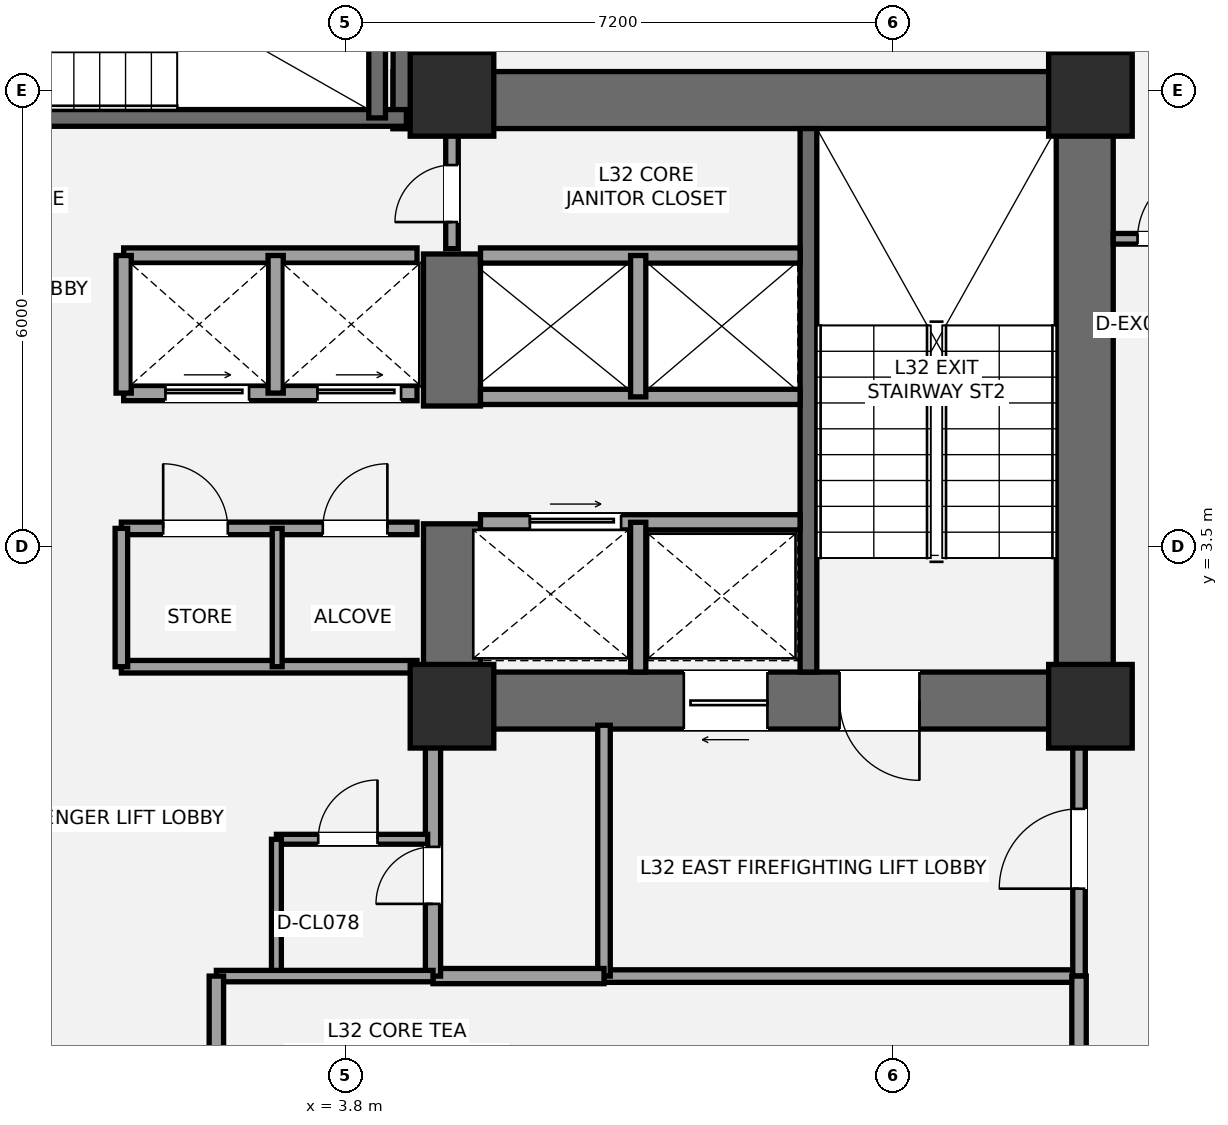
"""IFC4 building model, lengths in metres.
Left out: names, types, materials, properties, quantities, classifications, styles, units other than length and angle.
Written with IfcOpenShell. Run it as: python <this file> out.ifc"""

import sys

from ifc_helpers import new_model, si_unit, direction, frame, frame_2d, origin, origin_2d, place, context, subcontext, project, spatial, rectangle, extrude, element, fill, save


model = new_model("IFC4")
c1 = context("Model", 3, precision=1e-05, world=origin(), true_north=direction((0.0, 1.0)))
c2 = subcontext(c1, "Body", "Model", "MODEL_VIEW")
j1 = project(units=[si_unit("LENGTHUNIT", "METRE"), si_unit("PLANEANGLEUNIT", "RADIAN")], contexts=[c1])
p1 = place(None, origin())
s1 = spatial("IfcSite", under=j1, at=p1, CompositionType="ELEMENT")
p2 = place(p1, origin())
s2 = spatial("IfcBuilding", under=s1, at=p2, CompositionType="ELEMENT")
p3 = place(p2, frame((0.0, 0.0, 121.1)))
s3 = spatial("IfcBuildingStorey", under=s2, at=p3, CompositionType="ELEMENT", Elevation=121.1)
p4 = place(p3, frame((13.525, 1.1, 0.0), z_axis=(0.0, 0.0, 1.0), x_axis=(0.0, 1.0, 0.0)))
e1 = element("IfcWall", 1, at=p4, inside=s3, PredefinedType="SHEAR", context=c2, shape_type="SweptSolid", body=[
    extrude(rectangle(XDim=8.65, YDim=0.75, at=frame_2d((4.325, 0.0))), origin(), (0.0, 0.0, 1.0), 3.5),
])
p5 = place(p3, frame((4.425, 9.375, 0.0), z_axis=(0.0, 0.0, 1.0), x_axis=(1.0, 0.0, 0.0)))
e2 = element("IfcWall", 2, at=p5, inside=s3, PredefinedType="SHEAR", context=c2, shape_type="SweptSolid", body=[
    extrude(rectangle(XDim=9.475, YDim=0.75, at=frame_2d((4.737, 0.0))), origin(), (0.0, 0.0, 1.0), 3.5),
])
p6 = place(p3, frame((13.9, 1.475, 0.0), z_axis=(0.0, 0.0, 1.0), x_axis=(-1.0, 0.0, 0.0)))
e3 = element("IfcWall", 3, at=p6, inside=s3, PredefinedType="SHEAR", context=c2, shape_type="SweptSolid", body=[
    extrude(rectangle(XDim=9.075, YDim=0.75, at=frame_2d((4.538, 0.0))), origin(), (0.0, 0.0, 1.0), 3.5),
])
p7 = place(p6, frame((2.55, 0.0, 0.0)))
e4 = element("IfcOpeningElement", 4, at=p7, cuts=e3, PredefinedType="OPENING", context=c2, shape_type="SweptSolid", body=[
    extrude(rectangle(XDim=1.05, YDim=2.15, at=frame_2d((0.525, 1.075))), frame((0.0, 0.385, 0.0), z_axis=(0.0, -1.0, 0.0), x_axis=(1.0, 0.0, 0.0)), (0.0, 0.0, 1.0), 0.77),
])
p8 = place(p6, frame((4.55, 0.0, 0.0)))
e5 = element("IfcOpeningElement", 5, at=p8, cuts=e3, PredefinedType="OPENING", context=c2, shape_type="SweptSolid", body=[
    extrude(rectangle(XDim=1.1, YDim=2.2, at=frame_2d((0.55, 1.1))), frame((0.0, 0.385, 0.0), z_axis=(0.0, -1.0, 0.0), x_axis=(1.0, 0.0, 0.0)), (0.0, 0.0, 1.0), 0.77),
])
p9 = place(p3, frame((5.2, 1.1, 0.0), z_axis=(0.0, 0.0, 1.0), x_axis=(0.0, 1.0, 0.0)))
e6 = element("IfcWall", 6, at=p9, inside=s3, PredefinedType="SHEAR", context=c2, shape_type="SweptSolid", body=[
    extrude(rectangle(XDim=2.7, YDim=0.75, at=frame_2d((1.35, 0.0))), origin(), (0.0, 0.0, 1.0), 3.5),
])
p10 = place(p3, frame((5.2, 5.35, 0.0), z_axis=(0.0, 0.0, 1.0), x_axis=(0.0, 1.0, 0.0)))
e7 = element("IfcWall", 7, at=p10, inside=s3, PredefinedType="SHEAR", context=c2, shape_type="SweptSolid", body=[
    extrude(rectangle(XDim=2.0, YDim=0.75, at=frame_2d((1.0, 0.0))), origin(), (0.0, 0.0, 1.0), 3.5),
])
p11 = place(p3, frame((9.89, 1.85, 0.0), z_axis=(0.0, 0.0, 1.0), x_axis=(0.0, 1.0, 0.0)))
e8 = element("IfcWall", 8, at=p11, inside=s3, PredefinedType="SHEAR", context=c2, shape_type="SweptSolid", body=[
    extrude(rectangle(XDim=7.15, YDim=0.22, at=frame_2d((3.575, 0.0))), origin(), (0.0, 0.0, 1.0), 3.5),
])
p12 = place(p3, frame((4.8, 9.0, 0.0), z_axis=(0.0, 0.0, 1.0), x_axis=(0.0, 1.0, 0.0)))
e9 = element("IfcWall", 9, at=p12, inside=s3, PredefinedType="SHEAR", context=c2, shape_type="SweptSolid", body=[
    extrude(rectangle(XDim=4.15, YDim=0.75, at=frame_2d((2.075, 0.0))), origin(), (0.0, 0.0, 1.0), 3.5),
])
p13 = place(p3, frame((-4.7, 9.14, 0.0), z_axis=(0.0, 0.0, 1.0), x_axis=(1.0, 0.0, 0.0)))
e10 = element("IfcWall", 10, at=p13, inside=s3, PredefinedType="SHEAR", context=c2, shape_type="SweptSolid", body=[
    extrude(rectangle(XDim=9.3, YDim=0.22, at=frame_2d((4.65, 0.0))), origin(), (0.0, 0.0, 1.0), 3.5),
])
p14 = place(p13, frame((1.15, 0.0, 0.0)))
e11 = element("IfcOpeningElement", 11, at=p14, cuts=e10, PredefinedType="OPENING", context=c2, shape_type="SweptSolid", body=[
    extrude(rectangle(XDim=1.05, YDim=2.15, at=frame_2d((0.525, 1.075))), frame((0.0, 0.12, 0.0), z_axis=(0.0, -1.0, 0.0), x_axis=(1.0, 0.0, 0.0)), (0.0, 0.0, 1.0), 0.24),
])
p15 = place(p3, frame((4.215, 9.14, 0.0), z_axis=(0.0, 0.0, 1.0), x_axis=(0.0, 1.0, 0.0)))
e12 = element("IfcWall", 12, at=p15, inside=s3, PredefinedType="SHEAR", context=c2, shape_type="SweptSolid", body=[
    extrude(rectangle(XDim=3.26, YDim=0.22, at=frame_2d((1.63, 0.0))), origin(), (0.0, 0.0, 1.0), 3.5),
])
for number, where, z_axis, x_axis in (
    (13, (5.2, 1.4, 0.0), (0.0, 0.0, 1.0), (1.0, 0.0, 0.0)),
    (14, (5.2, 9.45, 0.0), (0.0, 0.0, 1.0), (1.0, 0.0, 0.0)),
    (15, (13.6, 1.4, 0.0), (0.0, 0.0, 1.0), (1.0, 0.0, 0.0)),
    (16, (13.6, 9.45, 0.0), (0.0, 0.0, 1.0), (1.0, 0.0, 0.0)),
):
    element("IfcColumn", number, at=place(p3, frame(where, z_axis=z_axis, x_axis=x_axis)), inside=s3, PredefinedType="COLUMN", context=c2, shape_type="SweptSolid", body=[
        extrude(rectangle(XDim=1.1, YDim=1.1, at=origin_2d()), origin(), (0.0, 0.0, 1.0), 3.5),
    ])
p16 = place(p3, frame((7.2, -2.15, 0.0), z_axis=(0.0, 0.0, 1.0), x_axis=(1.0, 0.0, 0.0)))
e17 = element("IfcWall", 17, at=p16, inside=s3, PredefinedType="PARTITIONING", context=c2, shape_type="SweptSolid", body=[
    extrude(rectangle(XDim=6.25, YDim=0.165, at=frame_2d((3.125, 0.0))), origin(), (0.0, 0.0, 1.0), 3.31),
])
p17 = place(p3, frame((7.2, -2.15, 0.0), z_axis=(0.0, 0.0, 1.0), x_axis=(0.0, 1.0, 0.0)))
e18 = element("IfcWall", 18, at=p17, inside=s3, PredefinedType="PARTITIONING", context=c2, shape_type="SweptSolid", body=[
    extrude(rectangle(XDim=3.3, YDim=0.165, at=frame_2d((1.65, 0.0))), origin(), (0.0, 0.0, 1.0), 2.763),
])
p18 = place(p3, frame((13.45, -2.15, 0.0), z_axis=(0.0, 0.0, 1.0), x_axis=(0.0, 1.0, 0.0)))
e19 = element("IfcWall", 19, at=p18, inside=s3, PredefinedType="PARTITIONING", context=c2, shape_type="SweptSolid", body=[
    extrude(rectangle(XDim=3.3, YDim=0.165, at=frame_2d((1.65, 0.0))), origin(), (0.0, 0.0, 1.0), 2.763),
])
p19 = place(p18, frame((1.15, 0.0, 0.0)))
e20 = element("IfcOpeningElement", 20, at=p19, cuts=e19, PredefinedType="OPENING", context=c2, shape_type="SweptSolid", body=[
    extrude(rectangle(XDim=1.05, YDim=2.15, at=frame_2d((0.525, 1.075))), frame((0.0, 0.093, 0.0), z_axis=(0.0, -1.0, 0.0), x_axis=(1.0, 0.0, 0.0)), (0.0, 0.0, 1.0), 0.185),
])
p20 = place(p3, frame((4.95, -2.15, 0.0), z_axis=(0.0, 0.0, 1.0), x_axis=(1.0, 0.0, 0.0)))
e21 = element("IfcWall", 21, at=p20, inside=s3, PredefinedType="SOLIDWALL", context=c2, shape_type="SweptSolid", body=[
    extrude(rectangle(XDim=2.25, YDim=0.2, at=frame_2d((1.125, 0.0))), origin(), (0.0, 0.0, 1.0), 3.31),
])
p21 = place(p3, frame((4.95, -2.15, 0.0), z_axis=(0.0, 0.0, 1.0), x_axis=(0.0, 1.0, 0.0)))
e22 = element("IfcWall", 22, at=p21, inside=s3, PredefinedType="SOLIDWALL", context=c2, shape_type="SweptSolid", body=[
    extrude(rectangle(XDim=3.3, YDim=0.2, at=frame_2d((1.65, 0.0))), origin(), (0.0, 0.0, 1.0), 2.763),
])
p22 = place(p21, frame((0.95, 0.0, 0.0)))
e23 = element("IfcOpeningElement", 23, at=p22, cuts=e22, PredefinedType="OPENING", context=c2, shape_type="SweptSolid", body=[
    extrude(rectangle(XDim=0.75, YDim=2.1, at=frame_2d((0.375, 1.05))), frame((0.0, 0.11, 0.0), z_axis=(0.0, -1.0, 0.0), x_axis=(1.0, 0.0, 0.0)), (0.0, 0.0, 1.0), 0.22),
])
p23 = place(p3, frame((2.89, -0.35, 0.0), z_axis=(0.0, 0.0, 1.0), x_axis=(1.0, 0.0, 0.0)))
e24 = element("IfcWall", 24, at=p23, inside=s3, PredefinedType="PARTITIONING", context=c2, shape_type="SweptSolid", body=[
    extrude(rectangle(XDim=1.99, YDim=0.13, at=frame_2d((0.995, 0.0))), origin(), (0.0, 0.0, 1.0), 3.31),
])
p24 = place(p23, frame((0.55, 0.0, 0.0)))
e25 = element("IfcOpeningElement", 25, at=p24, cuts=e24, PredefinedType="OPENING", context=c2, shape_type="SweptSolid", body=[
    extrude(rectangle(XDim=0.78, YDim=2.1, at=frame_2d((0.39, 1.05))), frame((0.0, 0.075, 0.0), z_axis=(0.0, -1.0, 0.0), x_axis=(1.0, 0.0, 0.0)), (0.0, 0.0, 1.0), 0.15),
])
p25 = place(p3, frame((2.89, -2.15, 0.0), z_axis=(0.0, 0.0, 1.0), x_axis=(0.0, 1.0, 0.0)))
e26 = element("IfcWall", 26, at=p25, inside=s3, PredefinedType="PARTITIONING", context=c2, shape_type="SweptSolid", body=[
    extrude(rectangle(XDim=1.8, YDim=0.13, at=frame_2d((0.9, 0.0))), origin(), (0.0, 0.0, 1.0), 3.31),
])
p26 = place(p3, frame((5.575, 3.82, 0.0), z_axis=(0.0, 0.0, 1.0), x_axis=(1.0, 0.0, 0.0)))
e27 = element("IfcWall", 27, at=p26, inside=s3, PredefinedType="SOLIDWALL", context=c2, shape_type="SweptSolid", body=[
    extrude(rectangle(XDim=4.205, YDim=0.2, at=frame_2d((2.103, 0.0))), origin(), (0.0, 0.0, 1.0), 3.31),
])
p27 = place(p26, frame((0.65, 0.0, 0.0)))
e28 = element("IfcOpeningElement", 28, at=p27, cuts=e27, PredefinedType="OPENING", context=c2, shape_type="SweptSolid", body=[
    extrude(rectangle(XDim=1.2, YDim=2.2, at=frame_2d((0.6, 1.1))), frame((0.0, 0.11, 0.0), z_axis=(0.0, -1.0, 0.0), x_axis=(1.0, 0.0, 0.0)), (0.0, 0.0, 1.0), 0.22),
])
p28 = place(p3, frame((7.65, 1.85, 0.0), z_axis=(0.0, 0.0, 1.0), x_axis=(0.0, 1.0, 0.0)))
e29 = element("IfcWall", 29, at=p28, inside=s3, PredefinedType="SOLIDWALL", context=c2, shape_type="SweptSolid", body=[
    extrude(rectangle(XDim=1.97, YDim=0.2, at=frame_2d((0.985, 0.0))), origin(), (0.0, 0.0, 1.0), 3.31),
])
for number, where, z_axis, x_axis in (
    (30, (5.575, 5.47, 0.0), (0.0, 0.0, 1.0), (1.0, 0.0, 0.0)),
    (31, (5.575, 7.33, 0.0), (0.0, 0.0, 1.0), (1.0, 0.0, 0.0)),
):
    element("IfcWall", number, at=place(p3, frame(where, z_axis=z_axis, x_axis=x_axis)), inside=s3, PredefinedType="SOLIDWALL", context=c2, shape_type="SweptSolid", body=[
        extrude(rectangle(XDim=4.205, YDim=0.2, at=frame_2d((2.103, 0.0))), origin(), (0.0, 0.0, 1.0), 3.31),
    ])
p29 = place(p3, frame((7.65, 5.47, 0.0), z_axis=(0.0, 0.0, 1.0), x_axis=(0.0, 1.0, 0.0)))
e32 = element("IfcWall", 32, at=p29, inside=s3, PredefinedType="SOLIDWALL", context=c2, shape_type="SweptSolid", body=[
    extrude(rectangle(XDim=1.86, YDim=0.2, at=frame_2d((0.93, 0.0))), origin(), (0.0, 0.0, 1.0), 3.31),
])
p30 = place(p3, frame((0.85, 1.92, 0.0), z_axis=(0.0, 0.0, 1.0), x_axis=(1.0, 0.0, 0.0)))
e33 = element("IfcWall", 33, at=p30, inside=s3, PredefinedType="PARTITIONING", context=c2, shape_type="SweptSolid", body=[
    extrude(rectangle(XDim=3.89, YDim=0.165, at=frame_2d((1.945, 0.0))), origin(), (0.0, 0.0, 1.0), 2.3),
])
p31 = place(p3, frame((0.85, 3.74, 0.0), z_axis=(0.0, 0.0, 1.0), x_axis=(1.0, 0.0, 0.0)))
e34 = element("IfcWall", 34, at=p31, inside=s3, PredefinedType="PARTITIONING", context=c2, shape_type="SweptSolid", body=[
    extrude(rectangle(XDim=3.89, YDim=0.165, at=frame_2d((1.945, 0.0))), origin(), (0.0, 0.0, 1.0), 3.31),
])
p32 = place(p31, frame((0.55, 0.0, 0.0)))
e35 = element("IfcOpeningElement", 35, at=p32, cuts=e34, PredefinedType="OPENING", context=c2, shape_type="SweptSolid", body=[
    extrude(rectangle(XDim=0.85, YDim=2.1, at=frame_2d((0.425, 1.05))), frame((0.0, 0.093, 0.0), z_axis=(0.0, -1.0, 0.0), x_axis=(1.0, 0.0, 0.0)), (0.0, 0.0, 1.0), 0.185),
])
p33 = place(p31, frame((2.65, 0.0, 0.0)))
e36 = element("IfcOpeningElement", 36, at=p33, cuts=e34, PredefinedType="OPENING", context=c2, shape_type="SweptSolid", body=[
    extrude(rectangle(XDim=0.85, YDim=2.1, at=frame_2d((0.425, 1.05))), frame((0.0, 0.093, 0.0), z_axis=(0.0, -1.0, 0.0), x_axis=(1.0, 0.0, 0.0)), (0.0, 0.0, 1.0), 0.185),
])
p34 = place(p3, frame((0.85, 1.92, 0.0), z_axis=(0.0, 0.0, 1.0), x_axis=(0.0, 1.0, 0.0)))
e37 = element("IfcWall", 37, at=p34, inside=s3, PredefinedType="PARTITIONING", context=c2, shape_type="SweptSolid", body=[
    extrude(rectangle(XDim=1.82, YDim=0.165, at=frame_2d((0.91, 0.0))), origin(), (0.0, 0.0, 1.0), 3.31),
])
p35 = place(p3, frame((2.9, 1.92, 0.0), z_axis=(0.0, 0.0, 1.0), x_axis=(0.0, 1.0, 0.0)))
e38 = element("IfcWall", 38, at=p35, inside=s3, PredefinedType="PARTITIONING", context=c2, shape_type="SweptSolid", body=[
    extrude(rectangle(XDim=1.82, YDim=0.13, at=frame_2d((0.91, 0.0))), origin(), (0.0, 0.0, 1.0), 3.31),
])
p36 = place(p3, frame((0.88, 5.52, 0.0), z_axis=(0.0, 0.0, 1.0), x_axis=(1.0, 0.0, 0.0)))
e39 = element("IfcWall", 39, at=p36, inside=s3, PredefinedType="SOLIDWALL", context=c2, shape_type="SweptSolid", body=[
    extrude(rectangle(XDim=3.86, YDim=0.2, at=frame_2d((1.93, 0.0))), origin(), (0.0, 0.0, 1.0), 3.31),
])
p37 = place(p36, frame((0.55, 0.0, 0.0)))
e40 = element("IfcOpeningElement", 40, at=p37, cuts=e39, PredefinedType="OPENING", context=c2, shape_type="SweptSolid", body=[
    extrude(rectangle(XDim=1.1, YDim=2.2, at=frame_2d((0.55, 1.1))), frame((0.0, 0.11, 0.0), z_axis=(0.0, -1.0, 0.0), x_axis=(1.0, 0.0, 0.0)), (0.0, 0.0, 1.0), 0.22),
])
p38 = place(p36, frame((2.55, 0.0, 0.0)))
e41 = element("IfcOpeningElement", 41, at=p38, cuts=e39, PredefinedType="OPENING", context=c2, shape_type="SweptSolid", body=[
    extrude(rectangle(XDim=1.1, YDim=2.2, at=frame_2d((0.55, 1.1))), frame((0.0, 0.11, 0.0), z_axis=(0.0, -1.0, 0.0), x_axis=(1.0, 0.0, 0.0)), (0.0, 0.0, 1.0), 0.22),
])
p39 = place(p3, frame((0.88, 7.33, 0.0), z_axis=(0.0, 0.0, 1.0), x_axis=(1.0, 0.0, 0.0)))
e42 = element("IfcWall", 42, at=p39, inside=s3, PredefinedType="SOLIDWALL", context=c2, shape_type="SweptSolid", body=[
    extrude(rectangle(XDim=3.86, YDim=0.2, at=frame_2d((1.93, 0.0))), origin(), (0.0, 0.0, 1.0), 3.31),
])
for number, where, z_axis, x_axis in (
    (43, (2.88, 5.52, 0.0), (0.0, 0.0, 1.0), (0.0, 1.0, 0.0)),
    (44, (0.88, 5.52, 0.0), (0.0, 0.0, 1.0), (0.0, 1.0, 0.0)),
):
    element("IfcWall", number, at=place(p3, frame(where, z_axis=z_axis, x_axis=x_axis)), inside=s3, PredefinedType="SOLIDWALL", context=c2, shape_type="SweptSolid", body=[
        extrude(rectangle(XDim=1.81, YDim=0.2, at=frame_2d((0.905, 0.0))), origin(), (0.0, 0.0, 1.0), 3.31),
    ])
p40 = place(p3, frame((5.2, 7.42, 0.0), z_axis=(0.0, 0.0, 1.0), x_axis=(0.0, 1.0, 0.0)))
e45 = element("IfcWall", 45, at=p40, inside=s3, PredefinedType="PARTITIONING", context=c2, shape_type="SweptSolid", body=[
    extrude(rectangle(XDim=1.58, YDim=0.165, at=frame_2d((0.79, 0.0))), origin(), (0.0, 0.0, 1.0), 3.31),
])
p41 = place(p40, frame((0.35, 0.0, 0.0)))
e46 = element("IfcOpeningElement", 46, at=p41, cuts=e45, PredefinedType="OPENING", context=c2, shape_type="SweptSolid", body=[
    extrude(rectangle(XDim=0.75, YDim=2.1, at=frame_2d((0.375, 1.05))), frame((0.0, 0.093, 0.0), z_axis=(0.0, -1.0, 0.0), x_axis=(1.0, 0.0, 0.0)), (0.0, 0.0, 1.0), 0.185),
])
p42 = place(p3, frame((2.1, -2.15, 0.0), z_axis=(0.0, 0.0, 1.0), x_axis=(1.0, 0.0, 0.0)))
e47 = element("IfcWall", 47, at=p42, inside=s3, PredefinedType="PLUMBINGWALL", context=c2, shape_type="SweptSolid", body=[
    extrude(rectangle(XDim=2.85, YDim=0.15, at=frame_2d((1.425, 0.0))), origin(), (0.0, 0.0, 1.0), 3.31),
])
for number, where, z_axis, x_axis in (
    (48, (2.1, -4.05, 0.0), (0.0, 0.0, 1.0), (0.0, 1.0, 0.0)),
    (49, (13.45, -4.05, 0.0), (0.0, 0.0, 1.0), (0.0, 1.0, 0.0)),
):
    element("IfcWall", number, at=place(p3, frame(where, z_axis=z_axis, x_axis=x_axis)), inside=s3, PredefinedType="PLUMBINGWALL", context=c2, shape_type="SweptSolid", body=[
        extrude(rectangle(XDim=1.9, YDim=0.19, at=frame_2d((0.95, 0.0))), origin(), (0.0, 0.0, 1.0), 3.31),
    ])
p43 = place(p3, frame((13.9, 7.55, 0.0), z_axis=(0.0, 0.0, 1.0), x_axis=(1.0, 0.0, 0.0)))
e50 = element("IfcWall", 50, at=p43, inside=s3, PredefinedType="PARTITIONING", context=c2, shape_type="SweptSolid", body=[
    extrude(rectangle(XDim=3.9, YDim=0.14, at=frame_2d((1.95, 0.0))), origin(), (0.0, 0.0, 1.0), 2.763),
])
p44 = place(p43, frame((0.32, 0.0, 0.0)))
e51 = element("IfcOpeningElement", 51, at=p44, cuts=e50, PredefinedType="OPENING", context=c2, shape_type="SweptSolid", body=[
    extrude(rectangle(XDim=0.92, YDim=2.15, at=frame_2d((0.46, 1.075))), frame((0.0, 0.08, 0.0), z_axis=(0.0, -1.0, 0.0), x_axis=(1.0, 0.0, 0.0)), (0.0, 0.0, 1.0), 0.16),
])
p45 = place(p7, origin())
e52 = element("IfcDoor", 52, at=p45, inside=s3, OperationType="SINGLE_SWING_LEFT", PredefinedType="DOOR", context=c2, shape_type="SweptSolid", body=[
    extrude(rectangle(XDim=1.05, YDim=2.15, at=frame_2d((0.525, 1.075))), frame((0.0, 0.025, 0.0), z_axis=(0.0, -1.0, 0.0), x_axis=(1.0, 0.0, 0.0)), (0.0, 0.0, 1.0), 0.05),
])
fill(e4, e52)
p46 = place(p19, origin())
e53 = element("IfcDoor", 53, at=p46, inside=s3, OperationType="SINGLE_SWING_LEFT", PredefinedType="DOOR", context=c2, shape_type="SweptSolid", body=[
    extrude(rectangle(XDim=1.05, YDim=2.15, at=frame_2d((0.525, 1.075))), frame((0.0, 0.025, 0.0), z_axis=(0.0, -1.0, 0.0), x_axis=(1.0, 0.0, 0.0)), (0.0, 0.0, 1.0), 0.05),
])
fill(e20, e53)
p47 = place(p22, origin())
e54 = element("IfcDoor", 54, at=p47, inside=s3, OperationType="SINGLE_SWING_LEFT", PredefinedType="DOOR", context=c2, shape_type="SweptSolid", body=[
    extrude(rectangle(XDim=0.75, YDim=2.1, at=frame_2d((0.375, 1.05))), frame((0.0, 0.025, 0.0), z_axis=(0.0, -1.0, 0.0), x_axis=(1.0, 0.0, 0.0)), (0.0, 0.0, 1.0), 0.05),
])
fill(e23, e54)
p48 = place(p24, origin())
e55 = element("IfcDoor", 55, at=p48, inside=s3, OperationType="SINGLE_SWING_RIGHT", PredefinedType="DOOR", context=c2, shape_type="SweptSolid", body=[
    extrude(rectangle(XDim=0.78, YDim=2.1, at=frame_2d((0.39, 1.05))), frame((0.0, 0.025, 0.0), z_axis=(0.0, -1.0, 0.0), x_axis=(1.0, 0.0, 0.0)), (0.0, 0.0, 1.0), 0.05),
])
fill(e25, e55)
p49 = place(p8, origin())
e56 = element("IfcDoor", 56, at=p49, inside=s3, OperationType="SLIDING_TO_LEFT", PredefinedType="DOOR", context=c2, shape_type="SweptSolid", body=[
    extrude(rectangle(XDim=1.1, YDim=2.2, at=frame_2d((0.55, 1.1))), frame((0.0, 0.025, 0.0), z_axis=(0.0, -1.0, 0.0), x_axis=(1.0, 0.0, 0.0)), (0.0, 0.0, 1.0), 0.05),
])
fill(e5, e56)
p50 = place(p27, origin())
e57 = element("IfcDoor", 57, at=p50, inside=s3, OperationType="SLIDING_TO_RIGHT", PredefinedType="DOOR", context=c2, shape_type="SweptSolid", body=[
    extrude(rectangle(XDim=1.2, YDim=2.2, at=frame_2d((0.6, 1.1))), frame((0.0, 0.025, 0.0), z_axis=(0.0, -1.0, 0.0), x_axis=(1.0, 0.0, 0.0)), (0.0, 0.0, 1.0), 0.05),
])
fill(e28, e57)
p51 = place(p32, origin())
e58 = element("IfcDoor", 58, at=p51, inside=s3, OperationType="SINGLE_SWING_LEFT", PredefinedType="DOOR", context=c2, shape_type="SweptSolid", body=[
    extrude(rectangle(XDim=0.85, YDim=2.1, at=frame_2d((0.425, 1.05))), frame((0.0, 0.025, 0.0), z_axis=(0.0, -1.0, 0.0), x_axis=(1.0, 0.0, 0.0)), (0.0, 0.0, 1.0), 0.05),
])
fill(e35, e58)
p52 = place(p33, origin())
e59 = element("IfcDoor", 59, at=p52, inside=s3, OperationType="SINGLE_SWING_RIGHT", PredefinedType="DOOR", context=c2, shape_type="SweptSolid", body=[
    extrude(rectangle(XDim=0.85, YDim=2.1, at=frame_2d((0.425, 1.05))), frame((0.0, 0.025, 0.0), z_axis=(0.0, -1.0, 0.0), x_axis=(1.0, 0.0, 0.0)), (0.0, 0.0, 1.0), 0.05),
])
fill(e36, e59)
p53 = place(p37, origin())
e60 = element("IfcDoor", 60, at=p53, inside=s3, OperationType="SLIDING_TO_LEFT", PredefinedType="DOOR", context=c2, shape_type="SweptSolid", body=[
    extrude(rectangle(XDim=1.1, YDim=2.2, at=frame_2d((0.55, 1.1))), frame((0.0, 0.025, 0.0), z_axis=(0.0, -1.0, 0.0), x_axis=(1.0, 0.0, 0.0)), (0.0, 0.0, 1.0), 0.05),
])
fill(e40, e60)
p54 = place(p38, origin())
e61 = element("IfcDoor", 61, at=p54, inside=s3, OperationType="SLIDING_TO_LEFT", PredefinedType="DOOR", context=c2, shape_type="SweptSolid", body=[
    extrude(rectangle(XDim=1.1, YDim=2.2, at=frame_2d((0.55, 1.1))), frame((0.0, 0.025, 0.0), z_axis=(0.0, -1.0, 0.0), x_axis=(1.0, 0.0, 0.0)), (0.0, 0.0, 1.0), 0.05),
])
fill(e41, e61)
p55 = place(p41, origin())
e62 = element("IfcDoor", 62, at=p55, inside=s3, OperationType="SINGLE_SWING_LEFT", PredefinedType="DOOR", context=c2, shape_type="SweptSolid", body=[
    extrude(rectangle(XDim=0.75, YDim=2.1, at=frame_2d((0.375, 1.05))), frame((0.0, 0.025, 0.0), z_axis=(0.0, -1.0, 0.0), x_axis=(1.0, 0.0, 0.0)), (0.0, 0.0, 1.0), 0.05),
])
fill(e46, e62)
p56 = place(p44, origin())
e63 = element("IfcDoor", 63, at=p56, inside=s3, OperationType="SINGLE_SWING_RIGHT", PredefinedType="DOOR", context=c2, shape_type="SweptSolid", body=[
    extrude(rectangle(XDim=0.92, YDim=2.15, at=frame_2d((0.46, 1.075))), frame((0.0, 0.025, 0.0), z_axis=(0.0, -1.0, 0.0), x_axis=(1.0, 0.0, 0.0)), (0.0, 0.0, 1.0), 0.05),
])
fill(e51, e63)
save(model, sys.argv[1])
